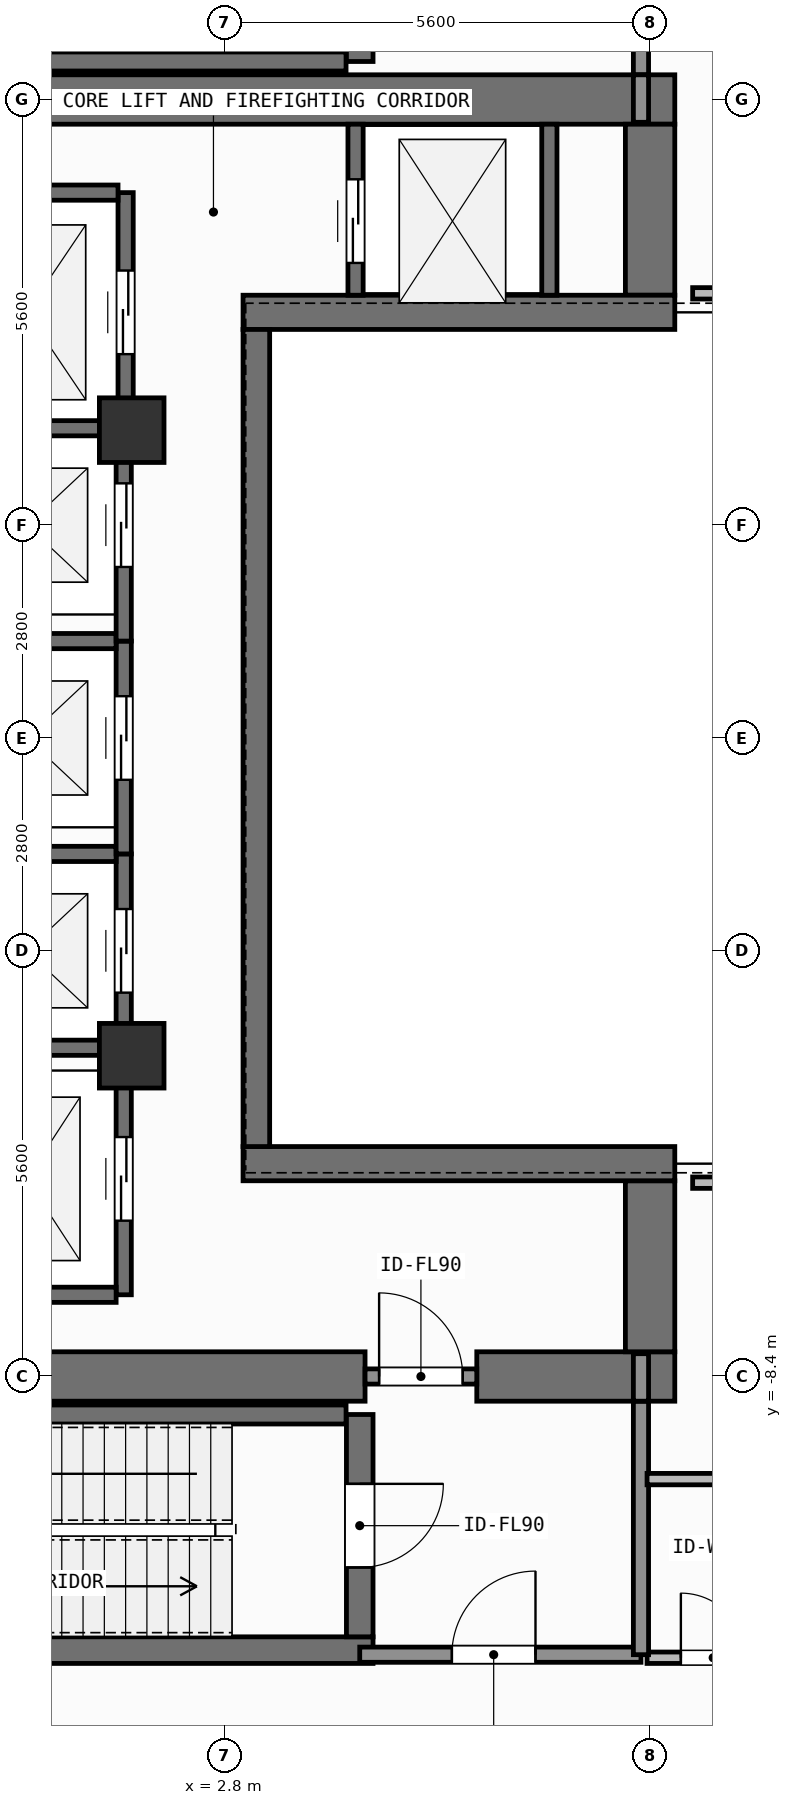
"""IFC4 building model, lengths in metres.
Left out: names, types, materials, properties, quantities, classifications, styles, units other than length and angle.
Written with IfcOpenShell. Run it as: python <this file> out.ifc"""

import sys

from ifc_helpers import new_model, si_unit, direction, frame, frame_2d, origin, origin_2d, place, context, subcontext, project, spatial, rectangle, extrude, element, fill, save


model = new_model("IFC4")
c1 = context("Model", 3, precision=1e-05, world=origin(), true_north=direction((0.0, 1.0)))
c2 = subcontext(c1, "Body", "Model", "MODEL_VIEW")
j1 = project(units=[si_unit("LENGTHUNIT", "METRE"), si_unit("PLANEANGLEUNIT", "RADIAN")], contexts=[c1])
p1 = place(None, origin())
s1 = spatial("IfcSite", under=j1, at=p1, CompositionType="ELEMENT")
p2 = place(p1, origin())
s2 = spatial("IfcBuilding", under=s1, at=p2, CompositionType="ELEMENT")
p3 = place(p2, frame((0.0, 0.0, 289.8)))
s3 = spatial("IfcBuildingStorey", under=s2, at=p3, CompositionType="ELEMENT", Elevation=289.8)
p4 = place(p3, frame((-2.62, -8.4, 0.0), z_axis=(0.0, 0.0, 1.0), x_axis=(1.0, 0.0, 0.0)))
e1 = element("IfcWall", 1, at=p4, inside=s3, PredefinedType="SHEAR", context=c2, shape_type="SweptSolid", body=[
    extrude(rectangle(XDim=7.27, YDim=0.65, at=frame_2d((3.635, 0.0))), origin(), (0.0, 0.0, 1.0), 3.9),
])
p5 = place(p3, frame((6.12, -8.4, 0.0), z_axis=(0.0, 0.0, 1.0), x_axis=(1.0, 0.0, 0.0)))
e2 = element("IfcWall", 2, at=p5, inside=s3, PredefinedType="SHEAR", context=c2, shape_type="SweptSolid", body=[
    extrude(rectangle(XDim=2.605, YDim=0.65, at=frame_2d((1.302, 0.0))), origin(), (0.0, 0.0, 1.0), 3.9),
])
p6 = place(p3, frame((-7.55, 8.4, 0.0), z_axis=(0.0, 0.0, 1.0), x_axis=(1.0, 0.0, 0.0)))
e3 = element("IfcWall", 3, at=p6, inside=s3, PredefinedType="SHEAR", context=c2, shape_type="SweptSolid", body=[
    extrude(rectangle(XDim=16.275, YDim=0.65, at=frame_2d((8.138, 0.0))), origin(), (0.0, 0.0, 1.0), 3.9),
])
for number, where, z_axis, x_axis in (
    (4, (8.4, -8.075, 0.0), (0.0, 0.0, 1.0), (0.0, 1.0, 0.0)),
    (5, (8.4, 5.825, 0.0), (0.0, 0.0, 1.0), (0.0, 1.0, 0.0)),
):
    element("IfcWall", number, at=place(p3, frame(where, z_axis=z_axis, x_axis=x_axis)), inside=s3, PredefinedType="SHEAR", context=c2, shape_type="SweptSolid", body=[
        extrude(rectangle(XDim=2.25, YDim=0.65, at=frame_2d((1.125, 0.0))), origin(), (0.0, 0.0, 1.0), 3.9),
    ])
for number, where, z_axis, x_axis in (
    (6, (3.045, -5.6, 0.0), (0.0, 0.0, 1.0), (1.0, 0.0, 0.0)),
    (7, (3.045, 5.6, 0.0), (0.0, 0.0, 1.0), (1.0, 0.0, 0.0)),
):
    element("IfcWall", number, at=place(p3, frame(where, z_axis=z_axis, x_axis=x_axis)), inside=s3, PredefinedType="SHEAR", context=c2, shape_type="SweptSolid", body=[
        extrude(rectangle(XDim=5.68, YDim=0.45, at=frame_2d((2.84, 0.0))), origin(), (0.0, 0.0, 1.0), 3.9),
    ])
p7 = place(p3, frame((3.22, -5.375, 0.0), z_axis=(0.0, 0.0, 1.0), x_axis=(0.0, 1.0, 0.0)))
e8 = element("IfcWall", 8, at=p7, inside=s3, PredefinedType="SHEAR", context=c2, shape_type="SweptSolid", body=[
    extrude(rectangle(XDim=10.75, YDim=0.35, at=frame_2d((5.375, 0.0))), origin(), (0.0, 0.0, 1.0), 3.9),
])
p8 = place(p3, frame((-2.555, -12.0, 0.0), z_axis=(0.0, 0.0, 1.0), x_axis=(1.0, 0.0, 0.0)))
e9 = element("IfcWall", 9, at=p8, inside=s3, PredefinedType="SHEAR", context=c2, shape_type="SweptSolid", body=[
    extrude(rectangle(XDim=7.31, YDim=0.35, at=frame_2d((3.655, 0.0))), origin(), (0.0, 0.0, 1.0), 3.9),
])
p9 = place(p3, frame((-2.2, -8.9, 0.0), z_axis=(0.0, 0.0, 1.0), x_axis=(1.0, 0.0, 0.0)))
e10 = element("IfcWall", 10, at=p9, inside=s3, PredefinedType="SHEAR", context=c2, shape_type="SweptSolid", body=[
    extrude(rectangle(XDim=6.6, YDim=0.25, at=frame_2d((3.3, 0.0))), origin(), (0.0, 0.0, 1.0), 3.9),
])
p10 = place(p3, frame((4.58, -8.9, 0.0), z_axis=(0.0, 0.0, 1.0), x_axis=(0.0, -1.0, 0.0)))
e11 = element("IfcWall", 11, at=p10, inside=s3, PredefinedType="SHEAR", context=c2, shape_type="SweptSolid", body=[
    extrude(rectangle(XDim=2.925, YDim=0.35, at=frame_2d((1.462, 0.0))), origin(), (0.0, 0.0, 1.0), 3.9),
])
p11 = place(p10, frame((0.913, 0.0, 0.0)))
e12 = element("IfcOpeningElement", 12, at=p11, cuts=e11, PredefinedType="OPENING", context=c2, shape_type="SweptSolid", body=[
    extrude(rectangle(XDim=1.1, YDim=2.15, at=frame_2d((0.55, 1.075))), frame((0.0, 0.185, 0.0), z_axis=(0.0, -1.0, 0.0), x_axis=(1.0, 0.0, 0.0)), (0.0, 0.0, 1.0), 0.37),
])
p12 = place(p3, frame((-2.2, 8.9, 0.0), z_axis=(0.0, 0.0, 1.0), x_axis=(1.0, 0.0, 0.0)))
e13 = element("IfcWall", 13, at=p12, inside=s3, PredefinedType="SHEAR", context=c2, shape_type="SweptSolid", body=[
    extrude(rectangle(XDim=6.6, YDim=0.25, at=frame_2d((3.3, 0.0))), origin(), (0.0, 0.0, 1.0), 3.9),
])
p13 = place(p3, frame((4.58, 11.825, 0.0), z_axis=(0.0, 0.0, 1.0), x_axis=(0.0, -1.0, 0.0)))
e14 = element("IfcWall", 14, at=p13, inside=s3, PredefinedType="SHEAR", context=c2, shape_type="SweptSolid", body=[
    extrude(rectangle(XDim=2.925, YDim=0.35, at=frame_2d((1.462, 0.0))), origin(), (0.0, 0.0, 1.0), 3.9),
])
p14 = place(p13, frame((0.913, 0.0, 0.0)))
e15 = element("IfcOpeningElement", 15, at=p14, cuts=e14, PredefinedType="OPENING", context=c2, shape_type="SweptSolid", body=[
    extrude(rectangle(XDim=1.1, YDim=2.15, at=frame_2d((0.55, 1.075))), frame((0.0, 0.185, 0.0), z_axis=(0.0, -1.0, 0.0), x_axis=(1.0, 0.0, 0.0)), (0.0, 0.0, 1.0), 0.37),
])
for number, where, z_axis, x_axis in (
    (16, (1.58, -4.18, 0.0), (0.0, 0.0, 1.0), (1.0, 0.0, 0.0)),
    (17, (1.58, 4.05, 0.0), (0.0, 0.0, 1.0), (1.0, 0.0, 0.0)),
):
    element("IfcColumn", number, at=place(p3, frame(where, z_axis=z_axis, x_axis=x_axis)), inside=s3, PredefinedType="COLUMN", context=c2, shape_type="SweptSolid", body=[
        extrude(rectangle(XDim=0.85, YDim=0.85, at=origin_2d()), origin(), (0.0, 0.0, 1.0), 3.9),
    ])
p15 = place(p3, frame((1.475, -4.275, 0.0), z_axis=(0.0, 0.0, 1.0), x_axis=(0.0, 1.0, 0.0)))
e18 = element("IfcWall", 18, at=p15, inside=s3, PredefinedType="SHEAR", context=c2, shape_type="SweptSolid", body=[
    extrude(rectangle(XDim=2.75, YDim=0.2, at=frame_2d((1.375, 0.0))), origin(), (0.0, 0.0, 1.0), 3.68),
])
p16 = place(p15, frame((0.925, 0.0, 0.0)))
e19 = element("IfcOpeningElement", 19, at=p16, cuts=e18, PredefinedType="OPENING", context=c2, shape_type="SweptSolid", body=[
    extrude(rectangle(XDim=1.1, YDim=2.2, at=frame_2d((0.55, 1.1))), frame((0.0, 0.11, 0.0), z_axis=(0.0, -1.0, 0.0), x_axis=(1.0, 0.0, 0.0)), (0.0, 0.0, 1.0), 0.22),
])
for number, where, z_axis, x_axis in (
    (20, (-0.975, -4.075, 0.0), (0.0, 0.0, 1.0), (1.0, 0.0, 0.0)),
    (21, (-0.975, -1.525, 0.0), (0.0, 0.0, 1.0), (1.0, 0.0, 0.0)),
):
    element("IfcWall", number, at=place(p3, frame(where, z_axis=z_axis, x_axis=x_axis)), inside=s3, PredefinedType="SHEAR", context=c2, shape_type="SweptSolid", body=[
        extrude(rectangle(XDim=2.35, YDim=0.2, at=frame_2d((1.175, 0.0))), origin(), (0.0, 0.0, 1.0), 3.68),
    ])
p17 = place(p3, frame((1.475, -1.525, 0.0), z_axis=(0.0, 0.0, 1.0), x_axis=(0.0, 1.0, 0.0)))
e22 = element("IfcWall", 22, at=p17, inside=s3, PredefinedType="SHEAR", context=c2, shape_type="SweptSolid", body=[
    extrude(rectangle(XDim=2.8, YDim=0.2, at=frame_2d((1.4, 0.0))), origin(), (0.0, 0.0, 1.0), 3.68),
])
p18 = place(p17, frame((0.975, 0.0, 0.0)))
e23 = element("IfcOpeningElement", 23, at=p18, cuts=e22, PredefinedType="OPENING", context=c2, shape_type="SweptSolid", body=[
    extrude(rectangle(XDim=1.1, YDim=2.2, at=frame_2d((0.55, 1.1))), frame((0.0, 0.11, 0.0), z_axis=(0.0, -1.0, 0.0), x_axis=(1.0, 0.0, 0.0)), (0.0, 0.0, 1.0), 0.22),
])
p19 = place(p3, frame((-0.975, 1.275, 0.0), z_axis=(0.0, 0.0, 1.0), x_axis=(1.0, 0.0, 0.0)))
e24 = element("IfcWall", 24, at=p19, inside=s3, PredefinedType="SHEAR", context=c2, shape_type="SweptSolid", body=[
    extrude(rectangle(XDim=2.35, YDim=0.2, at=frame_2d((1.175, 0.0))), origin(), (0.0, 0.0, 1.0), 3.68),
])
p20 = place(p3, frame((1.475, 1.275, 0.0), z_axis=(0.0, 0.0, 1.0), x_axis=(0.0, 1.0, 0.0)))
e25 = element("IfcWall", 25, at=p20, inside=s3, PredefinedType="SHEAR", context=c2, shape_type="SweptSolid", body=[
    extrude(rectangle(XDim=2.8, YDim=0.2, at=frame_2d((1.4, 0.0))), origin(), (0.0, 0.0, 1.0), 3.68),
])
p21 = place(p20, frame((0.975, 0.0, 0.0)))
e26 = element("IfcOpeningElement", 26, at=p21, cuts=e25, PredefinedType="OPENING", context=c2, shape_type="SweptSolid", body=[
    extrude(rectangle(XDim=1.1, YDim=2.2, at=frame_2d((0.55, 1.1))), frame((0.0, 0.11, 0.0), z_axis=(0.0, -1.0, 0.0), x_axis=(1.0, 0.0, 0.0)), (0.0, 0.0, 1.0), 0.22),
])
p22 = place(p3, frame((-0.975, 4.075, 0.0), z_axis=(0.0, 0.0, 1.0), x_axis=(1.0, 0.0, 0.0)))
e27 = element("IfcWall", 27, at=p22, inside=s3, PredefinedType="SHEAR", context=c2, shape_type="SweptSolid", body=[
    extrude(rectangle(XDim=2.35, YDim=0.2, at=frame_2d((1.175, 0.0))), origin(), (0.0, 0.0, 1.0), 3.68),
])
p23 = place(p3, frame((1.5, 4.025, 0.0), z_axis=(0.0, 0.0, 1.0), x_axis=(0.0, 1.0, 0.0)))
e28 = element("IfcWall", 28, at=p23, inside=s3, PredefinedType="SHEAR", context=c2, shape_type="SweptSolid", body=[
    extrude(rectangle(XDim=3.15, YDim=0.2, at=frame_2d((1.575, 0.0))), origin(), (0.0, 0.0, 1.0), 3.68),
])
p24 = place(p23, frame((1.025, 0.0, 0.0)))
e29 = element("IfcOpeningElement", 29, at=p24, cuts=e28, PredefinedType="OPENING", context=c2, shape_type="SweptSolid", body=[
    extrude(rectangle(XDim=1.1, YDim=2.2, at=frame_2d((0.55, 1.1))), frame((0.0, 0.11, 0.0), z_axis=(0.0, -1.0, 0.0), x_axis=(1.0, 0.0, 0.0)), (0.0, 0.0, 1.0), 0.22),
])
p25 = place(p3, frame((-1.0, 7.175, 0.0), z_axis=(0.0, 0.0, 1.0), x_axis=(1.0, 0.0, 0.0)))
e30 = element("IfcWall", 30, at=p25, inside=s3, PredefinedType="SHEAR", context=c2, shape_type="SweptSolid", body=[
    extrude(rectangle(XDim=2.4, YDim=0.2, at=frame_2d((1.2, 0.0))), origin(), (0.0, 0.0, 1.0), 3.68),
])
p26 = place(p3, frame((1.475, -7.325, 0.0), z_axis=(0.0, 0.0, 1.0), x_axis=(0.0, 1.0, 0.0)))
e31 = element("IfcWall", 31, at=p26, inside=s3, PredefinedType="SHEAR", context=c2, shape_type="SweptSolid", body=[
    extrude(rectangle(XDim=3.05, YDim=0.2, at=frame_2d((1.525, 0.0))), origin(), (0.0, 0.0, 1.0), 3.68),
])
p27 = place(p26, frame((0.975, 0.0, 0.0)))
e32 = element("IfcOpeningElement", 32, at=p27, cuts=e31, PredefinedType="OPENING", context=c2, shape_type="SweptSolid", body=[
    extrude(rectangle(XDim=1.1, YDim=2.2, at=frame_2d((0.55, 1.1))), frame((0.0, 0.11, 0.0), z_axis=(0.0, -1.0, 0.0), x_axis=(1.0, 0.0, 0.0)), (0.0, 0.0, 1.0), 0.22),
])
p28 = place(p3, frame((-0.975, -7.325, 0.0), z_axis=(0.0, 0.0, 1.0), x_axis=(1.0, 0.0, 0.0)))
e33 = element("IfcWall", 33, at=p28, inside=s3, PredefinedType="SHEAR", context=c2, shape_type="SweptSolid", body=[
    extrude(rectangle(XDim=2.35, YDim=0.2, at=frame_2d((1.175, 0.0))), origin(), (0.0, 0.0, 1.0), 3.68),
])
p29 = place(p3, frame((4.525, 5.825, 0.0), z_axis=(0.0, 0.0, 1.0), x_axis=(0.0, 1.0, 0.0)))
e34 = element("IfcWall", 34, at=p29, inside=s3, PredefinedType="SHEAR", context=c2, shape_type="SweptSolid", body=[
    extrude(rectangle(XDim=2.25, YDim=0.2, at=frame_2d((1.125, 0.0))), origin(), (0.0, 0.0, 1.0), 3.68),
])
p30 = place(p29, frame((0.425, 0.0, 0.0)))
e35 = element("IfcOpeningElement", 35, at=p30, cuts=e34, PredefinedType="OPENING", context=c2, shape_type="SweptSolid", body=[
    extrude(rectangle(XDim=1.1, YDim=2.2, at=frame_2d((0.55, 1.1))), frame((0.0, 0.11, 0.0), z_axis=(0.0, -1.0, 0.0), x_axis=(1.0, 0.0, 0.0)), (0.0, 0.0, 1.0), 0.22),
])
p31 = place(p3, frame((7.075, 5.825, 0.0), z_axis=(0.0, 0.0, 1.0), x_axis=(0.0, 1.0, 0.0)))
e36 = element("IfcWall", 36, at=p31, inside=s3, PredefinedType="SHEAR", context=c2, shape_type="SweptSolid", body=[
    extrude(rectangle(XDim=2.25, YDim=0.2, at=frame_2d((1.125, 0.0))), origin(), (0.0, 0.0, 1.0), 3.68),
])
p32 = place(p3, frame((4.58, -12.06, 0.0), z_axis=(0.0, 0.0, 1.0), x_axis=(1.0, 0.0, 0.0)))
e37 = element("IfcWall", 37, at=p32, inside=s3, PredefinedType="SOLIDWALL", context=c2, shape_type="SweptSolid", body=[
    extrude(rectangle(XDim=3.7, YDim=0.2, at=frame_2d((1.85, 0.0))), origin(), (0.0, 0.0, 1.0), 3.68),
])
p33 = place(p32, frame((1.212, 0.0, 0.0)))
e38 = element("IfcOpeningElement", 38, at=p33, cuts=e37, PredefinedType="OPENING", context=c2, shape_type="SweptSolid", body=[
    extrude(rectangle(XDim=1.1, YDim=2.15, at=frame_2d((0.55, 1.075))), frame((0.0, 0.11, 0.0), z_axis=(0.0, -1.0, 0.0), x_axis=(1.0, 0.0, 0.0)), (0.0, 0.0, 1.0), 0.22),
])
p34 = place(p3, frame((4.65, -8.4, 0.0), z_axis=(0.0, 0.0, 1.0), x_axis=(1.0, 0.0, 0.0)))
e39 = element("IfcWall", 39, at=p34, inside=s3, PredefinedType="SOLIDWALL", context=c2, shape_type="SweptSolid", body=[
    extrude(rectangle(XDim=1.47, YDim=0.2, at=frame_2d((0.735, 0.0))), origin(), (0.0, 0.0, 1.0), 2.92),
])
p35 = place(p34, frame((0.185, 0.0, 0.0)))
e40 = element("IfcOpeningElement", 40, at=p35, cuts=e39, PredefinedType="OPENING", context=c2, shape_type="SweptSolid", body=[
    extrude(rectangle(XDim=1.1, YDim=2.15, at=frame_2d((0.55, 1.075))), frame((0.0, 0.11, 0.0), z_axis=(0.0, -1.0, 0.0), x_axis=(1.0, 0.0, 0.0)), (0.0, 0.0, 1.0), 0.22),
])
p36 = place(p3, frame((8.36, -12.1, 0.0), z_axis=(0.0, 0.0, 1.0), x_axis=(1.0, 0.0, 0.0)))
e41 = element("IfcWall", 41, at=p36, inside=s3, PredefinedType="PARTITIONING", context=c2, shape_type="SweptSolid", body=[
    extrude(rectangle(XDim=1.74, YDim=0.15, at=frame_2d((0.87, 0.0))), origin(), (0.0, 0.0, 1.0), 3.68),
])
p37 = place(p36, frame((0.445, 0.0, 0.0)))
e42 = element("IfcOpeningElement", 42, at=p37, cuts=e41, PredefinedType="OPENING", context=c2, shape_type="SweptSolid", body=[
    extrude(rectangle(XDim=0.85, YDim=2.1, at=frame_2d((0.425, 1.05))), frame((0.0, 0.085, 0.0), z_axis=(0.0, -1.0, 0.0), x_axis=(1.0, 0.0, 0.0)), (0.0, 0.0, 1.0), 0.17),
])
for number, where, z_axis, x_axis in (
    (43, (8.28, -12.06, 0.0), (0.0, 0.0, 1.0), (0.0, 1.0, 0.0)),
    (44, (8.28, 8.725, 0.0), (0.0, 0.0, 1.0), (0.0, 1.0, 0.0)),
):
    element("IfcWall", number, at=place(p3, frame(where, z_axis=z_axis, x_axis=x_axis)), inside=s3, PredefinedType="SOLIDWALL", context=c2, shape_type="SweptSolid", body=[
        extrude(rectangle(XDim=3.335, YDim=0.2, at=frame_2d((1.667, 0.0))), origin(), (0.0, 0.0, 1.0), 3.68),
    ])
p38 = place(p3, frame((8.28, -8.725, 0.0), z_axis=(0.0, 0.0, 1.0), x_axis=(0.0, 1.0, 0.0)))
e45 = element("IfcWall", 45, at=p38, inside=s3, PredefinedType="SOLIDWALL", context=c2, shape_type="SweptSolid", body=[
    extrude(rectangle(XDim=0.625, YDim=0.2, at=frame_2d((0.312, 0.0))), origin(), (0.0, 0.0, 1.0), 3.68),
])
p39 = place(p3, frame((8.36, -9.75, 0.0), z_axis=(0.0, 0.0, 1.0), x_axis=(1.0, 0.0, 0.0)))
e46 = element("IfcWall", 46, at=p39, inside=s3, PredefinedType="PARTITIONING", context=c2, shape_type="SweptSolid", body=[
    extrude(rectangle(XDim=1.74, YDim=0.15, at=frame_2d((0.87, 0.0))), origin(), (0.0, 0.0, 1.0), 3.68),
])
p40 = place(p3, frame((8.96, -5.85, 0.0), z_axis=(0.0, 0.0, 1.0), x_axis=(1.0, 0.0, 0.0)))
e47 = element("IfcWall", 47, at=p40, inside=s3, PredefinedType="PARTITIONING", context=c2, shape_type="SweptSolid", body=[
    extrude(rectangle(XDim=6.62, YDim=0.15, at=frame_2d((3.31, 0.0))), origin(), (0.0, 0.0, 1.0), 3.68),
])
p41 = place(p3, frame((8.28, 8.1, 0.0), z_axis=(0.0, 0.0, 1.0), x_axis=(0.0, 1.0, 0.0)))
e48 = element("IfcWall", 48, at=p41, inside=s3, PredefinedType="SOLIDWALL", context=c2, shape_type="SweptSolid", body=[
    extrude(rectangle(XDim=0.625, YDim=0.2, at=frame_2d((0.312, 0.0))), origin(), (0.0, 0.0, 1.0), 3.68),
])
p42 = place(p3, frame((8.96, 5.85, 0.0), z_axis=(0.0, 0.0, 1.0), x_axis=(1.0, 0.0, 0.0)))
e49 = element("IfcWall", 49, at=p42, inside=s3, PredefinedType="PARTITIONING", context=c2, shape_type="SweptSolid", body=[
    extrude(rectangle(XDim=6.62, YDim=0.15, at=frame_2d((3.31, 0.0))), origin(), (0.0, 0.0, 1.0), 3.68),
])
p43 = place(p16, origin())
e50 = element("IfcDoor", 50, at=p43, inside=s3, OperationType="SLIDING_TO_LEFT", PredefinedType="DOOR", context=c2, shape_type="SweptSolid", body=[
    extrude(rectangle(XDim=1.1, YDim=2.2, at=frame_2d((0.55, 1.1))), frame((0.0, 0.025, 0.0), z_axis=(0.0, -1.0, 0.0), x_axis=(1.0, 0.0, 0.0)), (0.0, 0.0, 1.0), 0.05),
])
fill(e19, e50)
p44 = place(p18, origin())
e51 = element("IfcDoor", 51, at=p44, inside=s3, OperationType="SLIDING_TO_LEFT", PredefinedType="DOOR", context=c2, shape_type="SweptSolid", body=[
    extrude(rectangle(XDim=1.1, YDim=2.2, at=frame_2d((0.55, 1.1))), frame((0.0, 0.025, 0.0), z_axis=(0.0, -1.0, 0.0), x_axis=(1.0, 0.0, 0.0)), (0.0, 0.0, 1.0), 0.05),
])
fill(e23, e51)
p45 = place(p21, origin())
e52 = element("IfcDoor", 52, at=p45, inside=s3, OperationType="SLIDING_TO_LEFT", PredefinedType="DOOR", context=c2, shape_type="SweptSolid", body=[
    extrude(rectangle(XDim=1.1, YDim=2.2, at=frame_2d((0.55, 1.1))), frame((0.0, 0.025, 0.0), z_axis=(0.0, -1.0, 0.0), x_axis=(1.0, 0.0, 0.0)), (0.0, 0.0, 1.0), 0.05),
])
fill(e26, e52)
p46 = place(p24, origin())
e53 = element("IfcDoor", 53, at=p46, inside=s3, OperationType="SLIDING_TO_LEFT", PredefinedType="DOOR", context=c2, shape_type="SweptSolid", body=[
    extrude(rectangle(XDim=1.1, YDim=2.2, at=frame_2d((0.55, 1.1))), frame((0.0, 0.025, 0.0), z_axis=(0.0, -1.0, 0.0), x_axis=(1.0, 0.0, 0.0)), (0.0, 0.0, 1.0), 0.05),
])
fill(e29, e53)
p47 = place(p27, origin())
e54 = element("IfcDoor", 54, at=p47, inside=s3, OperationType="SLIDING_TO_LEFT", PredefinedType="DOOR", context=c2, shape_type="SweptSolid", body=[
    extrude(rectangle(XDim=1.1, YDim=2.2, at=frame_2d((0.55, 1.1))), frame((0.0, 0.025, 0.0), z_axis=(0.0, -1.0, 0.0), x_axis=(1.0, 0.0, 0.0)), (0.0, 0.0, 1.0), 0.05),
])
fill(e32, e54)
p48 = place(p30, origin())
e55 = element("IfcDoor", 55, at=p48, inside=s3, OperationType="SLIDING_TO_LEFT", PredefinedType="DOOR", context=c2, shape_type="SweptSolid", body=[
    extrude(rectangle(XDim=1.1, YDim=2.2, at=frame_2d((0.55, 1.1))), frame((0.0, 0.025, 0.0), z_axis=(0.0, -1.0, 0.0), x_axis=(1.0, 0.0, 0.0)), (0.0, 0.0, 1.0), 0.05),
])
fill(e35, e55)
p49 = place(p11, origin())
e56 = element("IfcDoor", 56, at=p49, inside=s3, OperationType="SINGLE_SWING_LEFT", PredefinedType="DOOR", context=c2, shape_type="SweptSolid", body=[
    extrude(rectangle(XDim=1.1, YDim=2.15, at=frame_2d((0.55, 1.075))), frame((0.0, 0.025, 0.0), z_axis=(0.0, -1.0, 0.0), x_axis=(1.0, 0.0, 0.0)), (0.0, 0.0, 1.0), 0.05),
])
fill(e12, e56)
p50 = place(p33, origin())
e57 = element("IfcDoor", 57, at=p50, inside=s3, OperationType="SINGLE_SWING_RIGHT", PredefinedType="DOOR", context=c2, shape_type="SweptSolid", body=[
    extrude(rectangle(XDim=1.1, YDim=2.15, at=frame_2d((0.55, 1.075))), frame((0.0, 0.025, 0.0), z_axis=(0.0, -1.0, 0.0), x_axis=(1.0, 0.0, 0.0)), (0.0, 0.0, 1.0), 0.05),
])
fill(e38, e57)
p51 = place(p35, origin())
e58 = element("IfcDoor", 58, at=p51, inside=s3, OperationType="SINGLE_SWING_LEFT", PredefinedType="DOOR", context=c2, shape_type="SweptSolid", body=[
    extrude(rectangle(XDim=1.1, YDim=2.15, at=frame_2d((0.55, 1.075))), frame((0.0, 0.025, 0.0), z_axis=(0.0, -1.0, 0.0), x_axis=(1.0, 0.0, 0.0)), (0.0, 0.0, 1.0), 0.05),
])
fill(e40, e58)
p52 = place(p37, origin())
e59 = element("IfcDoor", 59, at=p52, inside=s3, OperationType="SINGLE_SWING_LEFT", PredefinedType="DOOR", context=c2, shape_type="SweptSolid", body=[
    extrude(rectangle(XDim=0.85, YDim=2.1, at=frame_2d((0.425, 1.05))), frame((0.0, 0.025, 0.0), z_axis=(0.0, -1.0, 0.0), x_axis=(1.0, 0.0, 0.0)), (0.0, 0.0, 1.0), 0.05),
])
fill(e42, e59)
save(model, sys.argv[1])
